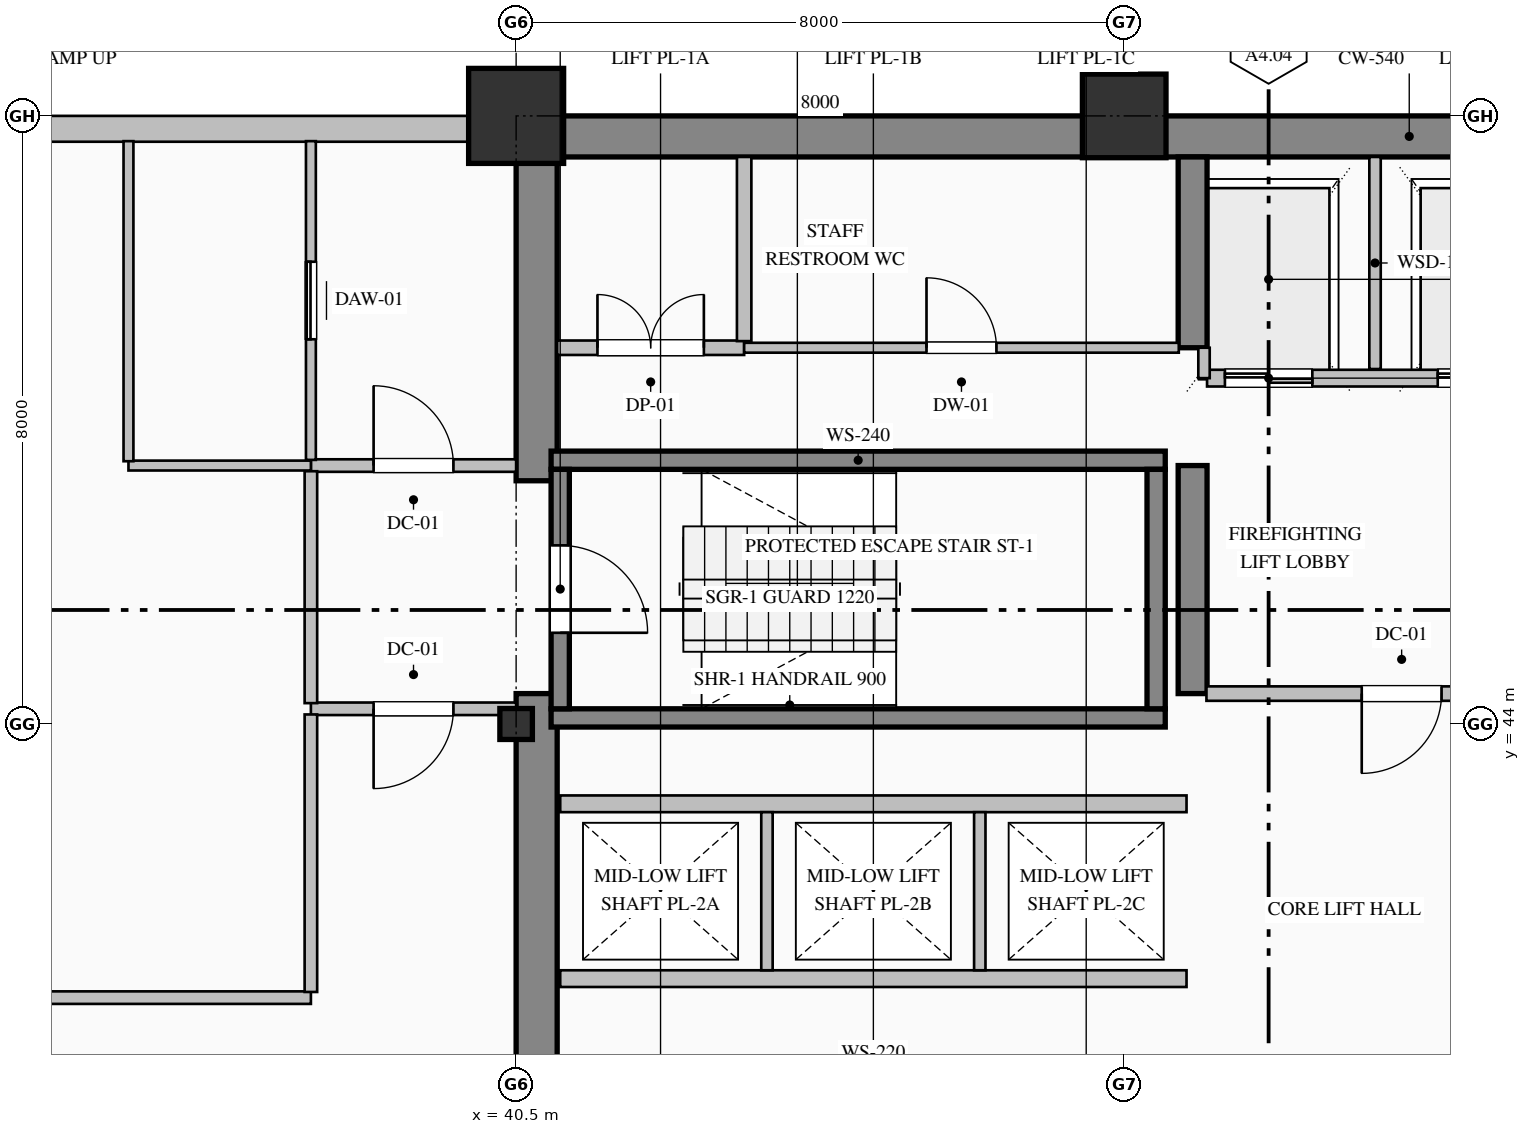
"""IFC4 building model, lengths in metres.
Left out: names, types, materials, properties, quantities, classifications, styles, units other than length and angle.
Written with IfcOpenShell. Run it as: python <this file> out.ifc"""

import sys

from ifc_helpers import new_model, si_unit, direction, frame, frame_2d, origin, origin_2d, place, context, subcontext, project, spatial, rectangle, hollow_rectangle, i_section, extrude, element, fill, save


model = new_model("IFC4")
c1 = context("Model", 3, precision=1e-05, world=origin(), true_north=direction((0.0, 1.0)))
c2 = subcontext(c1, "Body", "Model", "MODEL_VIEW")
j1 = project(units=[si_unit("LENGTHUNIT", "METRE"), si_unit("PLANEANGLEUNIT", "RADIAN")], contexts=[c1])
p1 = place(None, origin())
s1 = spatial("IfcSite", under=j1, at=p1, CompositionType="ELEMENT")
p2 = place(p1, origin())
s2 = spatial("IfcBuilding", under=s1, at=p2, CompositionType="ELEMENT")
p3 = place(p2, frame((0.0, 0.0, 64.2)))
s3 = spatial("IfcBuildingStorey", under=s2, at=p3, CompositionType="ELEMENT", Elevation=64.2)
p4 = place(p3, frame((40.5, 51.73, 0.0), z_axis=(0.0, 0.0, 1.0), x_axis=(1.0, 0.0, 0.0)))
e1 = element("IfcWall", 1, at=p4, inside=s3, PredefinedType="SHEAR", context=c2, shape_type="SweptSolid", body=[
    extrude(rectangle(XDim=23.5, YDim=0.54, at=frame_2d((11.75, 0.0))), origin(), (0.0, 0.0, 1.0), 3.75),
])
p5 = place(p3, frame((40.77, 36.54, 0.0), z_axis=(0.0, 0.0, 1.0), x_axis=(0.0, 1.0, 0.0)))
e2 = element("IfcWall", 2, at=p5, inside=s3, PredefinedType="SHEAR", context=c2, shape_type="SweptSolid", body=[
    extrude(rectangle(XDim=7.86, YDim=0.54, at=frame_2d((3.93, 0.0))), origin(), (0.0, 0.0, 1.0), 3.75),
])
p6 = place(p3, frame((40.77, 47.2, 0.0), z_axis=(0.0, 0.0, 1.0), x_axis=(0.0, 1.0, 0.0)))
e3 = element("IfcWall", 3, at=p6, inside=s3, PredefinedType="SHEAR", context=c2, shape_type="SweptSolid", body=[
    extrude(rectangle(XDim=4.26, YDim=0.54, at=frame_2d((2.13, 0.0))), origin(), (0.0, 0.0, 1.0), 3.75),
])
p7 = place(p3, frame((49.4, 44.4, 0.0), z_axis=(0.0, 0.0, 1.0), x_axis=(0.0, 1.0, 0.0)))
e4 = element("IfcWall", 4, at=p7, inside=s3, PredefinedType="SHEAR", context=c2, shape_type="SweptSolid", body=[
    extrude(rectangle(XDim=3.0, YDim=0.38, at=frame_2d((1.5, 0.0))), origin(), (0.0, 0.0, 1.0), 3.75),
])
p8 = place(p3, frame((49.4, 48.95, 0.0), z_axis=(0.0, 0.0, 1.0), x_axis=(0.0, 1.0, 0.0)))
e5 = element("IfcWall", 5, at=p8, inside=s3, PredefinedType="SHEAR", context=c2, shape_type="SweptSolid", body=[
    extrude(rectangle(XDim=2.51, YDim=0.38, at=frame_2d((1.255, 0.0))), origin(), (0.0, 0.0, 1.0), 3.75),
])
p9 = place(p3, frame((40.5, 44.0, 0.0), z_axis=(0.0, 0.0, 1.0), x_axis=(1.0, 0.0, 0.0)))
e6 = element("IfcColumn", 6, at=p9, inside=s3, PredefinedType="COLUMN", context=c2, shape_type="SweptSolid", body=[
    extrude(i_section(OverallWidth=0.407, OverallDepth=0.428, WebThickness=0.02, FlangeThickness=0.035, FilletRadius=0.022, at=origin_2d()), origin(), (0.0, 0.0, 1.0), 4.0),
])
p10 = place(p3, frame((40.5, 52.0, 0.0), z_axis=(0.0, 0.0, 1.0), x_axis=(1.0, 0.0, 0.0)))
e7 = element("IfcColumn", 7, at=p10, inside=s3, PredefinedType="COLUMN", context=c2, shape_type="SweptSolid", body=[
    extrude(hollow_rectangle(XDim=1.25, YDim=1.25, WallThickness=0.045, at=origin_2d()), origin(), (0.0, 0.0, 1.0), 4.0),
])
p11 = place(p3, frame((48.5, 52.0, 0.0), z_axis=(0.0, 0.0, 1.0), x_axis=(1.0, 0.0, 0.0)))
e8 = element("IfcColumn", 8, at=p11, inside=s3, PredefinedType="COLUMN", context=c2, shape_type="SweptSolid", body=[
    extrude(hollow_rectangle(XDim=1.1, YDim=1.1, WallThickness=0.04, at=origin_2d()), origin(), (0.0, 0.0, 1.0), 4.0),
])
p12 = place(p3, frame((4.0, 51.83, 0.0), z_axis=(0.0, 0.0, 1.0), x_axis=(1.0, 0.0, 0.0)))
e9 = element("IfcWall", 9, at=p12, inside=s3, PredefinedType="SOLIDWALL", context=c2, shape_type="SweptSolid", body=[
    extrude(rectangle(XDim=36.52, YDim=0.34, at=frame_2d((18.26, 0.0))), origin(), (0.0, 0.0, 1.0), 3.25),
])
p13 = place(p12, frame((6.3, 0.0, 0.85)))
e10 = element("IfcOpeningElement", 10, at=p13, cuts=e9, PredefinedType="OPENING", context=c2, shape_type="SweptSolid", body=[
    extrude(rectangle(XDim=1.8, YDim=2.05, at=frame_2d((0.9, 1.025))), frame((0.0, 0.18, 0.0), z_axis=(0.0, -1.0, 0.0), x_axis=(1.0, 0.0, 0.0)), (0.0, 0.0, 1.0), 0.36),
])
p14 = place(p12, frame((17.1, 0.0, 0.85)))
e11 = element("IfcOpeningElement", 11, at=p14, cuts=e9, PredefinedType="OPENING", context=c2, shape_type="SweptSolid", body=[
    extrude(rectangle(XDim=1.8, YDim=2.05, at=frame_2d((0.9, 1.025))), frame((0.0, 0.18, 0.0), z_axis=(0.0, -1.0, 0.0), x_axis=(1.0, 0.0, 0.0)), (0.0, 0.0, 1.0), 0.36),
])
p15 = place(p12, frame((24.0, 0.0, 0.8)))
e12 = element("IfcOpeningElement", 12, at=p15, cuts=e9, PredefinedType="OPENING", context=c2, shape_type="SweptSolid", body=[
    extrude(rectangle(XDim=2.4, YDim=2.15, at=frame_2d((1.2, 1.075))), frame((0.0, 0.18, 0.0), z_axis=(0.0, -1.0, 0.0), x_axis=(1.0, 0.0, 0.0)), (0.0, 0.0, 1.0), 0.36),
])
for number, where, z_axis, x_axis in (
    (13, (40.96, 47.47, 0.0), (0.0, 0.0, 1.0), (1.0, 0.0, 0.0)),
    (14, (49.04, 44.08, 0.0), (0.0, 0.0, 1.0), (-1.0, 0.0, 0.0)),
):
    element("IfcWall", number, at=place(p3, frame(where, z_axis=z_axis, x_axis=x_axis)), inside=s3, PredefinedType="SOLIDWALL", context=c2, shape_type="SweptSolid", body=[
        extrude(rectangle(XDim=8.08, YDim=0.24, at=frame_2d((4.04, 0.0))), origin(), (0.0, 0.0, 1.0), 4.0),
    ])
p16 = place(p3, frame((41.08, 47.35, 0.0), z_axis=(0.0, 0.0, 1.0), x_axis=(0.0, -1.0, 0.0)))
e15 = element("IfcWall", 15, at=p16, inside=s3, PredefinedType="SOLIDWALL", context=c2, shape_type="SweptSolid", body=[
    extrude(rectangle(XDim=3.15, YDim=0.24, at=frame_2d((1.575, 0.0))), origin(), (0.0, 0.0, 1.0), 4.0),
])
p17 = place(p16, frame((1.0, 0.0, 0.0)))
e16 = element("IfcOpeningElement", 16, at=p17, cuts=e15, PredefinedType="OPENING", context=c2, shape_type="SweptSolid", body=[
    extrude(rectangle(XDim=1.15, YDim=2.2, at=frame_2d((0.575, 1.1))), frame((0.0, 0.13, 0.0), z_axis=(0.0, -1.0, 0.0), x_axis=(1.0, 0.0, 0.0)), (0.0, 0.0, 1.0), 0.26),
])
p18 = place(p3, frame((48.92, 44.2, 0.0), z_axis=(0.0, 0.0, 1.0), x_axis=(0.0, 1.0, 0.0)))
e17 = element("IfcWall", 17, at=p18, inside=s3, PredefinedType="SOLIDWALL", context=c2, shape_type="SweptSolid", body=[
    extrude(rectangle(XDim=3.15, YDim=0.24, at=frame_2d((1.575, 0.0))), origin(), (0.0, 0.0, 1.0), 4.0),
])
p19 = place(p3, frame((54.71, 48.55, 0.0), z_axis=(0.0, 0.0, 1.0), x_axis=(-1.0, 0.0, 0.0)))
e18 = element("IfcWall", 18, at=p19, inside=s3, PredefinedType="PARTITIONING", context=c2, shape_type="SweptSolid", body=[
    extrude(rectangle(XDim=5.12, YDim=0.22, at=frame_2d((2.56, 0.0))), origin(), (0.0, 0.0, 1.0), 3.75),
])
p20 = place(p19, frame((3.735, 0.0, 0.0)))
e19 = element("IfcOpeningElement", 19, at=p20, cuts=e18, PredefinedType="OPENING", context=c2, shape_type="SweptSolid", body=[
    extrude(rectangle(XDim=1.15, YDim=2.2, at=frame_2d((0.575, 1.1))), frame((0.0, 0.12, 0.0), z_axis=(0.0, -1.0, 0.0), x_axis=(1.0, 0.0, 0.0)), (0.0, 0.0, 1.0), 0.24),
])
p21 = place(p19, frame((0.935, 0.0, 0.0)))
e20 = element("IfcOpeningElement", 20, at=p21, cuts=e18, PredefinedType="OPENING", context=c2, shape_type="SweptSolid", body=[
    extrude(rectangle(XDim=1.15, YDim=2.2, at=frame_2d((0.575, 1.1))), frame((0.0, 0.12, 0.0), z_axis=(0.0, -1.0, 0.0), x_axis=(1.0, 0.0, 0.0)), (0.0, 0.0, 1.0), 0.24),
])
p22 = place(p3, frame((51.8, 48.67, 0.0), z_axis=(0.0, 0.0, 1.0), x_axis=(0.0, 1.0, 0.0)))
e21 = element("IfcWall", 21, at=p22, inside=s3, PredefinedType="PARTITIONING", context=c2, shape_type="SweptSolid", body=[
    extrude(rectangle(XDim=2.79, YDim=0.15, at=frame_2d((1.395, 0.0))), origin(), (0.0, 0.0, 1.0), 3.75),
])
p23 = place(p3, frame((49.55, 48.55, 0.0), z_axis=(0.0, 0.0, 1.0), x_axis=(0.0, 1.0, 0.0)))
e22 = element("IfcWall", 22, at=p23, inside=s3, PredefinedType="PARTITIONING", context=c2, shape_type="SweptSolid", body=[
    extrude(rectangle(XDim=0.4, YDim=0.15, at=frame_2d((0.2, 0.0))), origin(), (0.0, 0.0, 1.0), 3.75),
])
for number, where, z_axis, x_axis in (
    (23, (49.32, 40.65, 0.0), (0.0, 0.0, 1.0), (-1.0, 0.0, 0.0)),
    (24, (41.08, 42.95, 0.0), (0.0, 0.0, 1.0), (1.0, 0.0, 0.0)),
):
    element("IfcWall", number, at=place(p3, frame(where, z_axis=z_axis, x_axis=x_axis)), inside=s3, PredefinedType="PARTITIONING", context=c2, shape_type="SweptSolid", body=[
        extrude(rectangle(XDim=8.24, YDim=0.22, at=frame_2d((4.12, 0.0))), origin(), (0.0, 0.0, 1.0), 3.75),
    ])
for number, where, z_axis, x_axis in (
    (25, (43.8, 40.76, 0.0), (0.0, 0.0, 1.0), (0.0, 1.0, 0.0)),
    (26, (46.6, 40.76, 0.0), (0.0, 0.0, 1.0), (0.0, 1.0, 0.0)),
):
    element("IfcWall", number, at=place(p3, frame(where, z_axis=z_axis, x_axis=x_axis)), inside=s3, PredefinedType="PARTITIONING", context=c2, shape_type="SweptSolid", body=[
        extrude(rectangle(XDim=2.08, YDim=0.15, at=frame_2d((1.04, 0.0))), origin(), (0.0, 0.0, 1.0), 3.75),
    ])
p24 = place(p3, frame((37.8, 47.4, 0.0), z_axis=(0.0, 0.0, 1.0), x_axis=(1.0, 0.0, 0.0)))
e27 = element("IfcWall", 27, at=p24, inside=s3, PredefinedType="PARTITIONING", context=c2, shape_type="SweptSolid", body=[
    extrude(rectangle(XDim=2.7, YDim=0.165, at=frame_2d((1.35, 0.0))), origin(), (0.0, 0.0, 1.0), 3.75),
])
p25 = place(p24, frame((0.825, 0.0, 0.0)))
e28 = element("IfcOpeningElement", 28, at=p25, cuts=e27, PredefinedType="OPENING", context=c2, shape_type="SweptSolid", body=[
    extrude(rectangle(XDim=1.05, YDim=2.15, at=frame_2d((0.525, 1.075))), frame((0.0, 0.093, 0.0), z_axis=(0.0, -1.0, 0.0), x_axis=(1.0, 0.0, 0.0)), (0.0, 0.0, 1.0), 0.185),
])
p26 = place(p3, frame((40.5, 44.2, 0.0), z_axis=(0.0, 0.0, 1.0), x_axis=(-1.0, 0.0, 0.0)))
e29 = element("IfcWall", 29, at=p26, inside=s3, PredefinedType="PARTITIONING", context=c2, shape_type="SweptSolid", body=[
    extrude(rectangle(XDim=2.7, YDim=0.165, at=frame_2d((1.35, 0.0))), origin(), (0.0, 0.0, 1.0), 3.75),
])
p27 = place(p26, frame((0.825, 0.0, 0.0)))
e30 = element("IfcOpeningElement", 30, at=p27, cuts=e29, PredefinedType="OPENING", context=c2, shape_type="SweptSolid", body=[
    extrude(rectangle(XDim=1.05, YDim=2.15, at=frame_2d((0.525, 1.075))), frame((0.0, 0.093, 0.0), z_axis=(0.0, -1.0, 0.0), x_axis=(1.0, 0.0, 0.0)), (0.0, 0.0, 1.0), 0.185),
])
p28 = place(p3, frame((37.8, 44.274, 0.0), z_axis=(0.0, 0.0, 1.0), x_axis=(0.0, 1.0, 0.0)))
e31 = element("IfcWall", 31, at=p28, inside=s3, PredefinedType="PARTITIONING", context=c2, shape_type="SweptSolid", body=[
    extrude(rectangle(XDim=3.051, YDim=0.165, at=frame_2d((1.525, 0.0))), origin(), (0.0, 0.0, 1.0), 3.75),
])
p29 = place(p3, frame((37.8, 47.475, 0.0), z_axis=(0.0, 0.0, 1.0), x_axis=(0.0, 1.0, 0.0)))
e32 = element("IfcWall", 32, at=p29, inside=s3, PredefinedType="PARTITIONING", context=c2, shape_type="SweptSolid", body=[
    extrude(rectangle(XDim=4.193, YDim=0.13, at=frame_2d((2.097, 0.0))), origin(), (0.0, 0.0, 1.0), 3.75),
])
p30 = place(p29, frame((1.587, 0.0, 0.0)))
e33 = element("IfcOpeningElement", 33, at=p30, cuts=e32, PredefinedType="OPENING", context=c2, shape_type="SweptSolid", body=[
    extrude(rectangle(XDim=1.02, YDim=2.15, at=frame_2d((0.51, 1.075))), frame((0.0, 0.075, 0.0), z_axis=(0.0, -1.0, 0.0), x_axis=(1.0, 0.0, 0.0)), (0.0, 0.0, 1.0), 0.15),
])
p31 = place(p3, frame((37.8, 47.4, 0.0), z_axis=(0.0, 0.0, 1.0), x_axis=(-1.0, 0.0, 0.0)))
e34 = element("IfcWall", 34, at=p31, inside=s3, PredefinedType="PARTITIONING", context=c2, shape_type="SweptSolid", body=[
    extrude(rectangle(XDim=2.4, YDim=0.13, at=frame_2d((1.2, 0.0))), origin(), (0.0, 0.0, 1.0), 3.75),
])
p32 = place(p3, frame((35.4, 47.457, 0.0), z_axis=(0.0, 0.0, 1.0), x_axis=(0.0, 1.0, 0.0)))
e35 = element("IfcWall", 35, at=p32, inside=s3, PredefinedType="PARTITIONING", context=c2, shape_type="SweptSolid", body=[
    extrude(rectangle(XDim=4.211, YDim=0.13, at=frame_2d((2.105, 0.0))), origin(), (0.0, 0.0, 1.0), 3.75),
])
p33 = place(p3, frame((41.04, 48.95, 0.0), z_axis=(0.0, 0.0, 1.0), x_axis=(1.0, 0.0, 0.0)))
e36 = element("IfcWall", 36, at=p33, inside=s3, PredefinedType="PARTITIONING", context=c2, shape_type="SweptSolid", body=[
    extrude(rectangle(XDim=2.46, YDim=0.19, at=frame_2d((1.23, 0.0))), origin(), (0.0, 0.0, 1.0), 3.75),
])
p34 = place(p33, frame((0.53, 0.0, 0.0)))
e37 = element("IfcOpeningElement", 37, at=p34, cuts=e36, PredefinedType="OPENING", context=c2, shape_type="SweptSolid", body=[
    extrude(rectangle(XDim=1.4, YDim=2.25, at=frame_2d((0.7, 1.125))), frame((0.0, 0.105, 0.0), z_axis=(0.0, -1.0, 0.0), x_axis=(1.0, 0.0, 0.0)), (0.0, 0.0, 1.0), 0.21),
])
p35 = place(p3, frame((43.5, 48.95, 0.0), z_axis=(0.0, 0.0, 1.0), x_axis=(1.0, 0.0, 0.0)))
e38 = element("IfcWall", 38, at=p35, inside=s3, PredefinedType="PARTITIONING", context=c2, shape_type="SweptSolid", body=[
    extrude(rectangle(XDim=5.718, YDim=0.13, at=frame_2d((2.859, 0.0))), origin(), (0.0, 0.0, 1.0), 3.75),
])
p36 = place(p35, frame((2.399, 0.0, 0.0)))
e39 = element("IfcOpeningElement", 39, at=p36, cuts=e38, PredefinedType="OPENING", context=c2, shape_type="SweptSolid", body=[
    extrude(rectangle(XDim=0.92, YDim=2.15, at=frame_2d((0.46, 1.075))), frame((0.0, 0.075, 0.0), z_axis=(0.0, -1.0, 0.0), x_axis=(1.0, 0.0, 0.0)), (0.0, 0.0, 1.0), 0.15),
])
p37 = place(p3, frame((54.718, 44.4, 0.0), z_axis=(0.0, 0.0, 1.0), x_axis=(-1.0, 0.0, 0.0)))
e40 = element("IfcWall", 40, at=p37, inside=s3, PredefinedType="PARTITIONING", context=c2, shape_type="SweptSolid", body=[
    extrude(rectangle(XDim=5.136, YDim=0.19, at=frame_2d((2.568, 0.0))), origin(), (0.0, 0.0, 1.0), 3.75),
])
p38 = place(p37, frame((2.043, 0.0, 0.0)))
e41 = element("IfcOpeningElement", 41, at=p38, cuts=e40, PredefinedType="OPENING", context=c2, shape_type="SweptSolid", body=[
    extrude(rectangle(XDim=1.05, YDim=2.15, at=frame_2d((0.525, 1.075))), frame((0.0, 0.105, 0.0), z_axis=(0.0, -1.0, 0.0), x_axis=(1.0, 0.0, 0.0)), (0.0, 0.0, 1.0), 0.21),
])
p39 = place(p3, frame((43.5, 51.46, 0.0), z_axis=(0.0, 0.0, 1.0), x_axis=(0.0, -1.0, 0.0)))
e42 = element("IfcWall", 42, at=p39, inside=s3, PredefinedType="PARTITIONING", context=c2, shape_type="SweptSolid", body=[
    extrude(rectangle(XDim=2.423, YDim=0.19, at=frame_2d((1.211, 0.0))), origin(), (0.0, 0.0, 1.0), 3.75),
])
p40 = place(p3, frame((24.5, 40.4, 0.0), z_axis=(0.0, 0.0, 1.0), x_axis=(1.0, 0.0, 0.0)))
e43 = element("IfcWall", 43, at=p40, inside=s3, PredefinedType="PARTITIONING", context=c2, shape_type="SweptSolid", body=[
    extrude(rectangle(XDim=13.3, YDim=0.165, at=frame_2d((6.65, 0.0))), origin(), (0.0, 0.0, 1.0), 3.75),
])
p41 = place(p40, frame((6.2, 0.0, 0.0)))
e44 = element("IfcOpeningElement", 44, at=p41, cuts=e43, PredefinedType="OPENING", context=c2, shape_type="SweptSolid", body=[
    extrude(rectangle(XDim=0.9, YDim=2.15, at=frame_2d((0.45, 1.075))), frame((0.0, 0.093, 0.0), z_axis=(0.0, -1.0, 0.0), x_axis=(1.0, 0.0, 0.0)), (0.0, 0.0, 1.0), 0.185),
])
p42 = place(p3, frame((37.8, 40.475, 0.0), z_axis=(0.0, 0.0, 1.0), x_axis=(0.0, 1.0, 0.0)))
e45 = element("IfcWall", 45, at=p42, inside=s3, PredefinedType="PARTITIONING", context=c2, shape_type="SweptSolid", body=[
    extrude(rectangle(XDim=3.651, YDim=0.165, at=frame_2d((1.825, 0.0))), origin(), (0.0, 0.0, 1.0), 3.75),
])
p43 = place(p17, origin())
e46 = element("IfcDoor", 46, at=p43, inside=s3, OperationType="SINGLE_SWING_RIGHT", PredefinedType="DOOR", context=c2, shape_type="SweptSolid", body=[
    extrude(rectangle(XDim=1.15, YDim=2.2, at=frame_2d((0.575, 1.1))), frame((0.0, 0.025, 0.0), z_axis=(0.0, -1.0, 0.0), x_axis=(1.0, 0.0, 0.0)), (0.0, 0.0, 1.0), 0.05),
])
fill(e16, e46)
p44 = place(p20, origin())
e47 = element("IfcDoor", 47, at=p44, inside=s3, OperationType="DOUBLE_DOOR_SLIDING", PredefinedType="DOOR", context=c2, shape_type="SweptSolid", body=[
    extrude(rectangle(XDim=1.15, YDim=2.2, at=frame_2d((0.575, 1.1))), frame((0.0, 0.025, 0.0), z_axis=(0.0, -1.0, 0.0), x_axis=(1.0, 0.0, 0.0)), (0.0, 0.0, 1.0), 0.05),
])
fill(e19, e47)
p45 = place(p21, origin())
e48 = element("IfcDoor", 48, at=p45, inside=s3, OperationType="DOUBLE_DOOR_SLIDING", PredefinedType="DOOR", context=c2, shape_type="SweptSolid", body=[
    extrude(rectangle(XDim=1.15, YDim=2.2, at=frame_2d((0.575, 1.1))), frame((0.0, 0.025, 0.0), z_axis=(0.0, -1.0, 0.0), x_axis=(1.0, 0.0, 0.0)), (0.0, 0.0, 1.0), 0.05),
])
fill(e20, e48)
p46 = place(p38, origin())
e49 = element("IfcDoor", 49, at=p46, inside=s3, OperationType="SINGLE_SWING_RIGHT", PredefinedType="DOOR", context=c2, shape_type="SweptSolid", body=[
    extrude(rectangle(XDim=1.05, YDim=2.15, at=frame_2d((0.525, 1.075))), frame((0.0, 0.025, 0.0), z_axis=(0.0, -1.0, 0.0), x_axis=(1.0, 0.0, 0.0)), (0.0, 0.0, 1.0), 0.05),
])
fill(e41, e49)
p47 = place(p25, origin())
e50 = element("IfcDoor", 50, at=p47, inside=s3, OperationType="SINGLE_SWING_LEFT", PredefinedType="DOOR", context=c2, shape_type="SweptSolid", body=[
    extrude(rectangle(XDim=1.05, YDim=2.15, at=frame_2d((0.525, 1.075))), frame((0.0, 0.025, 0.0), z_axis=(0.0, -1.0, 0.0), x_axis=(1.0, 0.0, 0.0)), (0.0, 0.0, 1.0), 0.05),
])
fill(e28, e50)
p48 = place(p27, origin())
e51 = element("IfcDoor", 51, at=p48, inside=s3, OperationType="SINGLE_SWING_RIGHT", PredefinedType="DOOR", context=c2, shape_type="SweptSolid", body=[
    extrude(rectangle(XDim=1.05, YDim=2.15, at=frame_2d((0.525, 1.075))), frame((0.0, 0.025, 0.0), z_axis=(0.0, -1.0, 0.0), x_axis=(1.0, 0.0, 0.0)), (0.0, 0.0, 1.0), 0.05),
])
fill(e30, e51)
p49 = place(p30, origin())
e52 = element("IfcDoor", 52, at=p49, inside=s3, OperationType="SLIDING_TO_LEFT", PredefinedType="DOOR", context=c2, shape_type="SweptSolid", body=[
    extrude(rectangle(XDim=1.02, YDim=2.15, at=frame_2d((0.51, 1.075))), frame((0.0, 0.025, 0.0), z_axis=(0.0, -1.0, 0.0), x_axis=(1.0, 0.0, 0.0)), (0.0, 0.0, 1.0), 0.05),
])
fill(e33, e52)
p50 = place(p34, origin())
e53 = element("IfcDoor", 53, at=p50, inside=s3, OperationType="DOUBLE_DOOR_SINGLE_SWING", PredefinedType="DOOR", context=c2, shape_type="SweptSolid", body=[
    extrude(rectangle(XDim=1.4, YDim=2.25, at=frame_2d((0.7, 1.125))), frame((0.0, 0.025, 0.0), z_axis=(0.0, -1.0, 0.0), x_axis=(1.0, 0.0, 0.0)), (0.0, 0.0, 1.0), 0.05),
])
fill(e37, e53)
p51 = place(p36, origin())
e54 = element("IfcDoor", 54, at=p51, inside=s3, OperationType="SINGLE_SWING_LEFT", PredefinedType="DOOR", context=c2, shape_type="SweptSolid", body=[
    extrude(rectangle(XDim=0.92, YDim=2.15, at=frame_2d((0.46, 1.075))), frame((0.0, 0.025, 0.0), z_axis=(0.0, -1.0, 0.0), x_axis=(1.0, 0.0, 0.0)), (0.0, 0.0, 1.0), 0.05),
])
fill(e39, e54)
save(model, sys.argv[1])
